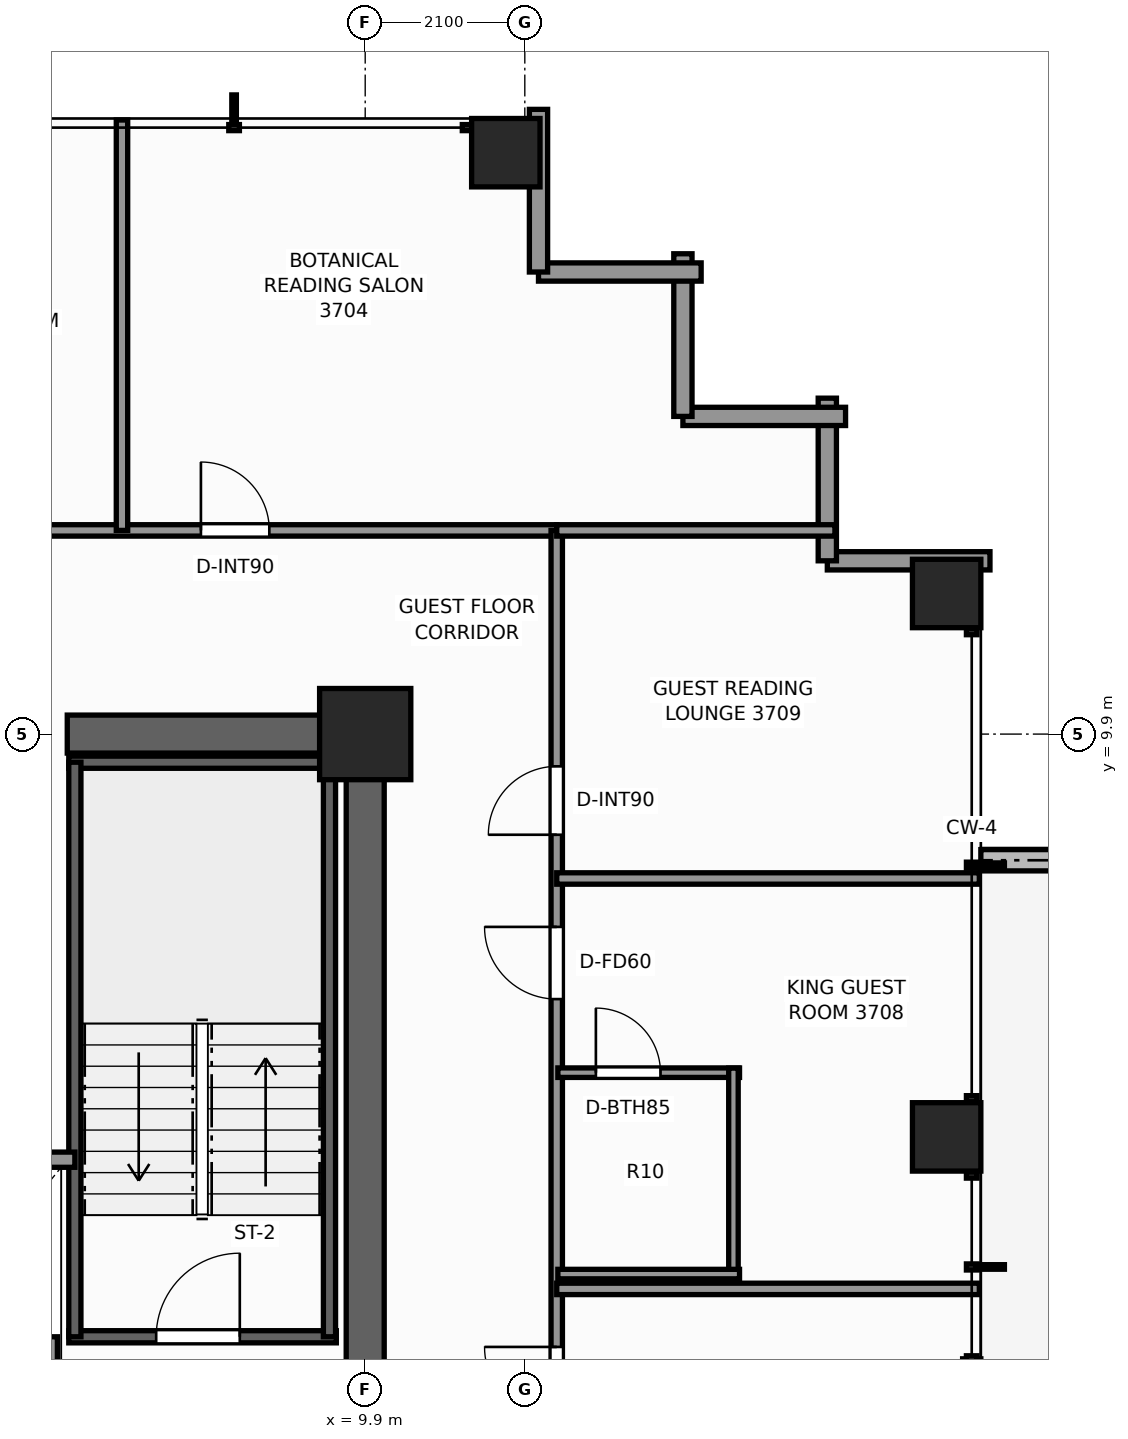
"""IFC4 building model, lengths in metres.
Left out: names, types, materials, properties, quantities, classifications, styles, units other than length and angle.
Written with IfcOpenShell. Run it as: python <this file> out.ifc"""

import sys

from ifc_helpers import new_model, si_unit, direction, frame, frame_2d, origin, origin_2d, place, context, subcontext, project, spatial, rectangle, extrude, element, fill, save


model = new_model("IFC4")
c1 = context("Model", 3, precision=1e-05, world=origin(), true_north=direction((0.0, 1.0)))
c2 = subcontext(c1, "Body", "Model", "MODEL_VIEW")
j1 = project(units=[si_unit("LENGTHUNIT", "METRE"), si_unit("PLANEANGLEUNIT", "RADIAN")], contexts=[c1])
p1 = place(None, origin())
s1 = spatial("IfcSite", under=j1, at=p1, CompositionType="ELEMENT")
p2 = place(p1, origin())
s2 = spatial("IfcBuilding", under=s1, at=p2, CompositionType="ELEMENT")
p3 = place(p2, frame((0.0, 0.0, 128.3)))
s3 = spatial("IfcBuildingStorey", under=s2, at=p3, CompositionType="ELEMENT", Elevation=128.3)
p4 = place(p3, frame((5.98, 9.9, 0.0), z_axis=(0.0, 0.0, 1.0), x_axis=(1.0, 0.0, 0.0)))
e1 = element("IfcWall", 1, at=p4, inside=s3, PredefinedType="SHEAR", context=c2, shape_type="SweptSolid", body=[
    extrude(rectangle(XDim=4.17, YDim=0.5, at=frame_2d((2.085, 0.0))), origin(), (0.0, 0.0, 1.0), 3.3),
])
p5 = place(p3, frame((9.9, -3.7, 0.0), z_axis=(0.0, 0.0, 1.0), x_axis=(0.0, 1.0, 0.0)))
e2 = element("IfcWall", 2, at=p5, inside=s3, PredefinedType="SHEAR", context=c2, shape_type="SweptSolid", body=[
    extrude(rectangle(XDim=13.35, YDim=0.5, at=frame_2d((6.675, 0.0))), origin(), (0.0, 0.0, 1.0), 3.3),
])
p6 = place(p5, frame((0.35, 0.0, 0.0)))
e3 = element("IfcOpeningElement", 3, at=p6, cuts=e2, PredefinedType="OPENING", context=c2, shape_type="SweptSolid", body=[
    extrude(rectangle(XDim=1.1, YDim=2.2, at=frame_2d((0.55, 1.1))), frame((0.0, 0.26, 0.0), z_axis=(0.0, -1.0, 0.0), x_axis=(1.0, 0.0, 0.0)), (0.0, 0.0, 1.0), 0.52),
])
p7 = place(p3, frame((9.9, 9.9, 0.0), z_axis=(0.0, 0.0, 1.0), x_axis=(1.0, 0.0, 0.0)))
e4 = element("IfcColumn", 4, at=p7, inside=s3, PredefinedType="COLUMN", context=c2, shape_type="SweptSolid", body=[
    extrude(rectangle(XDim=1.2, YDim=1.2, at=origin_2d()), origin(), (0.0, 0.0, 1.0), 3.3),
])
for number, where, z_axis, x_axis in (
    (5, (11.75, 17.55, 0.0), (0.0, 0.0, 1.0), (1.0, 0.0, 0.0)),
    (6, (17.55, 4.6, 0.0), (0.0, 0.0, 1.0), (1.0, 0.0, 0.0)),
    (7, (17.55, 11.75, 0.0), (0.0, 0.0, 1.0), (1.0, 0.0, 0.0)),
):
    element("IfcColumn", number, at=place(p3, frame(where, z_axis=z_axis, x_axis=x_axis)), inside=s3, PredefinedType="COLUMN", context=c2, shape_type="SweptSolid", body=[
        extrude(rectangle(XDim=0.9, YDim=0.9, at=origin_2d()), origin(), (0.0, 0.0, 1.0), 3.3),
    ])
p8 = place(p3, frame((19.313, 8.24, -0.02), z_axis=(0.0, 0.0, 1.0), x_axis=(-1.0, 0.0, 0.0)))
e8 = element("IfcWall", 8, at=p8, inside=s3, PredefinedType="PARAPET", context=c2, shape_type="SweptSolid", body=[
    extrude(rectangle(XDim=1.313, YDim=0.28, at=frame_2d((0.656, 0.0))), origin(), (0.0, 0.0, 1.0), 0.42),
])
for number, where, z_axis, x_axis in (
    (9, (15.98, 12.18, 0.0), (0.0, 0.0, 1.0), (1.0, 0.0, 0.0)),
    (10, (15.98, 14.32, 0.0), (0.0, 0.0, 1.0), (0.0, -1.0, 0.0)),
):
    element("IfcWall", number, at=place(p3, frame(where, z_axis=z_axis, x_axis=x_axis)), inside=s3, PredefinedType="STANDARD", context=c2, shape_type="SweptSolid", body=[
        extrude(rectangle(XDim=2.14, YDim=0.24, at=frame_2d((1.07, 0.0))), origin(), (0.0, 0.0, 1.0), 2.479),
    ])
for number, where, z_axis, x_axis in (
    (11, (14.08, 14.08, 0.0), (0.0, 0.0, 1.0), (1.0, 0.0, 0.0)),
    (12, (14.08, 16.22, 0.0), (0.0, 0.0, 1.0), (0.0, -1.0, 0.0)),
):
    element("IfcWall", number, at=place(p3, frame(where, z_axis=z_axis, x_axis=x_axis)), inside=s3, PredefinedType="STANDARD", context=c2, shape_type="SweptSolid", body=[
        extrude(rectangle(XDim=2.14, YDim=0.24, at=frame_2d((1.07, 0.0))), origin(), (0.0, 0.0, 1.0), 2.479),
    ])
for number, where, z_axis, x_axis in (
    (13, (12.18, 15.98, 0.0), (0.0, 0.0, 1.0), (1.0, 0.0, 0.0)),
    (14, (12.18, 18.12, 0.0), (0.0, 0.0, 1.0), (0.0, -1.0, 0.0)),
):
    element("IfcWall", number, at=place(p3, frame(where, z_axis=z_axis, x_axis=x_axis)), inside=s3, PredefinedType="STANDARD", context=c2, shape_type="SweptSolid", body=[
        extrude(rectangle(XDim=2.14, YDim=0.24, at=frame_2d((1.07, 0.0))), origin(), (0.0, 0.0, 1.0), 2.479),
    ])
p9 = place(p3, frame((6.0, 1.97, 0.0), z_axis=(0.0, 0.0, 1.0), x_axis=(1.0, 0.0, 0.0)))
e15 = element("IfcWall", 15, at=p9, inside=s3, PredefinedType="SHEAR", context=c2, shape_type="SweptSolid", body=[
    extrude(rectangle(XDim=3.52, YDim=0.16, at=frame_2d((1.76, 0.0))), origin(), (0.0, 0.0, 1.0), 3.3),
])
p10 = place(p9, frame((1.15, 0.0, 0.0)))
e16 = element("IfcOpeningElement", 16, at=p10, cuts=e15, PredefinedType="OPENING", context=c2, shape_type="SweptSolid", body=[
    extrude(rectangle(XDim=1.1, YDim=2.2, at=frame_2d((0.55, 1.1))), frame((0.0, 0.09, 0.0), z_axis=(0.0, -1.0, 0.0), x_axis=(1.0, 0.0, 0.0)), (0.0, 0.0, 1.0), 0.18),
])
p11 = place(p3, frame((6.0, 9.53, 0.0), z_axis=(0.0, 0.0, 1.0), x_axis=(1.0, 0.0, 0.0)))
e17 = element("IfcWall", 17, at=p11, inside=s3, PredefinedType="SHEAR", context=c2, shape_type="SweptSolid", body=[
    extrude(rectangle(XDim=3.52, YDim=0.16, at=frame_2d((1.76, 0.0))), origin(), (0.0, 0.0, 1.0), 3.3),
])
for number, where, z_axis, x_axis in (
    (18, (6.08, 1.97, 0.0), (0.0, 0.0, 1.0), (0.0, 1.0, 0.0)),
    (19, (9.43, 1.97, 0.0), (0.0, 0.0, 1.0), (0.0, 1.0, 0.0)),
):
    element("IfcWall", number, at=place(p3, frame(where, z_axis=z_axis, x_axis=x_axis)), inside=s3, PredefinedType="SHEAR", context=c2, shape_type="SweptSolid", body=[
        extrude(rectangle(XDim=7.56, YDim=0.16, at=frame_2d((3.78, 0.0))), origin(), (0.0, 0.0, 1.0), 3.3),
    ])
p12 = place(p3, frame((5.75, -3.6, 0.0), z_axis=(0.0, 0.0, 1.0), x_axis=(0.0, 1.0, 0.0)))
e20 = element("IfcWall", 20, at=p12, inside=s3, PredefinedType="SOLIDWALL", context=c2, shape_type="SweptSolid", body=[
    extrude(rectangle(XDim=5.57, YDim=0.2, at=frame_2d((2.785, 0.0))), origin(), (0.0, 0.0, 1.0), 2.735),
])
p13 = place(p12, frame((2.75, 0.0, 0.0)))
e21 = element("IfcOpeningElement", 21, at=p13, cuts=e20, PredefinedType="OPENING", context=c2, shape_type="SweptSolid", body=[
    extrude(rectangle(XDim=1.1, YDim=2.2, at=frame_2d((0.55, 1.1))), frame((0.0, 0.11, 0.0), z_axis=(0.0, -1.0, 0.0), x_axis=(1.0, 0.0, 0.0)), (0.0, 0.0, 1.0), 0.22),
])
p14 = place(p3, frame((3.35, 4.3, 0.0), z_axis=(0.0, 0.0, 1.0), x_axis=(1.0, 0.0, 0.0)))
e22 = element("IfcWall", 22, at=p14, inside=s3, PredefinedType="SOLIDWALL", context=c2, shape_type="SweptSolid", body=[
    extrude(rectangle(XDim=2.73, YDim=0.2, at=frame_2d((1.365, 0.0))), origin(), (0.0, 0.0, 1.0), 3.1),
])
p15 = place(p14, frame((0.75, 0.0, 0.0)))
e23 = element("IfcOpeningElement", 23, at=p15, cuts=e22, PredefinedType="OPENING", context=c2, shape_type="SweptSolid", body=[
    extrude(rectangle(XDim=1.2, YDim=2.25, at=frame_2d((0.6, 1.125))), frame((0.0, 0.11, 0.0), z_axis=(0.0, -1.0, 0.0), x_axis=(1.0, 0.0, 0.0)), (0.0, 0.0, 1.0), 0.22),
])
p16 = place(p3, frame((-12.26, 12.58, 0.0), z_axis=(0.0, 0.0, 1.0), x_axis=(1.0, 0.0, 0.0)))
e24 = element("IfcWall", 24, at=p16, inside=s3, PredefinedType="PARTITIONING", context=c2, shape_type="SweptSolid", body=[
    extrude(rectangle(XDim=24.68, YDim=0.15, at=frame_2d((12.34, 0.0))), origin(), (0.0, 0.0, 1.0), 2.312),
])
p17 = place(p16, frame((3.444, 0.0, 0.0)))
e25 = element("IfcOpeningElement", 25, at=p17, cuts=e24, PredefinedType="OPENING", context=c2, shape_type="SweptSolid", body=[
    extrude(rectangle(XDim=0.9, YDim=2.06, at=frame_2d((0.45, 1.03))), frame((0.0, 0.085, 0.0), z_axis=(0.0, -1.0, 0.0), x_axis=(1.0, 0.0, 0.0)), (0.0, 0.0, 1.0), 0.17),
])
p18 = place(p16, frame((5.779, 0.0, 0.0)))
e26 = element("IfcOpeningElement", 26, at=p18, cuts=e24, PredefinedType="OPENING", context=c2, shape_type="SweptSolid", body=[
    extrude(rectangle(XDim=0.9, YDim=2.06, at=frame_2d((0.45, 1.03))), frame((0.0, 0.085, 0.0), z_axis=(0.0, -1.0, 0.0), x_axis=(1.0, 0.0, 0.0)), (0.0, 0.0, 1.0), 0.17),
])
p19 = place(p16, frame((10.052, 0.0, 0.0)))
e27 = element("IfcOpeningElement", 27, at=p19, cuts=e24, PredefinedType="OPENING", context=c2, shape_type="SweptSolid", body=[
    extrude(rectangle(XDim=0.9, YDim=2.06, at=frame_2d((0.45, 1.03))), frame((0.0, 0.085, 0.0), z_axis=(0.0, -1.0, 0.0), x_axis=(1.0, 0.0, 0.0)), (0.0, 0.0, 1.0), 0.17),
])
p20 = place(p16, frame((13.179, 0.0, 0.0)))
e28 = element("IfcOpeningElement", 28, at=p20, cuts=e24, PredefinedType="OPENING", context=c2, shape_type="SweptSolid", body=[
    extrude(rectangle(XDim=0.95, YDim=2.06, at=frame_2d((0.475, 1.03))), frame((0.0, 0.085, 0.0), z_axis=(0.0, -1.0, 0.0), x_axis=(1.0, 0.0, 0.0)), (0.0, 0.0, 1.0), 0.17),
])
p21 = place(p16, frame((16.518, 0.0, 0.0)))
e29 = element("IfcOpeningElement", 29, at=p21, cuts=e24, PredefinedType="OPENING", context=c2, shape_type="SweptSolid", body=[
    extrude(rectangle(XDim=0.9, YDim=2.06, at=frame_2d((0.45, 1.03))), frame((0.0, 0.085, 0.0), z_axis=(0.0, -1.0, 0.0), x_axis=(1.0, 0.0, 0.0)), (0.0, 0.0, 1.0), 0.17),
])
p22 = place(p16, frame((19.999, 0.0, 0.0)))
e30 = element("IfcOpeningElement", 30, at=p22, cuts=e24, PredefinedType="OPENING", context=c2, shape_type="SweptSolid", body=[
    extrude(rectangle(XDim=0.9, YDim=2.06, at=frame_2d((0.45, 1.03))), frame((0.0, 0.085, 0.0), z_axis=(0.0, -1.0, 0.0), x_axis=(1.0, 0.0, 0.0)), (0.0, 0.0, 1.0), 0.17),
])
p23 = place(p3, frame((12.42, -12.26, 0.0), z_axis=(0.0, 0.0, 1.0), x_axis=(0.0, 1.0, 0.0)))
e31 = element("IfcWall", 31, at=p23, inside=s3, PredefinedType="PARTITIONING", context=c2, shape_type="SweptSolid", body=[
    extrude(rectangle(XDim=24.84, YDim=0.15, at=frame_2d((12.42, 0.0))), origin(), (0.0, 0.0, 1.0), 2.312),
])
p24 = place(p23, frame((3.831, 0.0, 0.0)))
e32 = element("IfcOpeningElement", 32, at=p24, cuts=e31, PredefinedType="OPENING", context=c2, shape_type="SweptSolid", body=[
    extrude(rectangle(XDim=0.95, YDim=2.06, at=frame_2d((0.475, 1.03))), frame((0.0, 0.085, 0.0), z_axis=(0.0, -1.0, 0.0), x_axis=(1.0, 0.0, 0.0)), (0.0, 0.0, 1.0), 0.17),
])
p25 = place(p23, frame((5.797, 0.0, 0.0)))
e33 = element("IfcOpeningElement", 33, at=p25, cuts=e31, PredefinedType="OPENING", context=c2, shape_type="SweptSolid", body=[
    extrude(rectangle(XDim=0.9, YDim=2.06, at=frame_2d((0.45, 1.03))), frame((0.0, 0.085, 0.0), z_axis=(0.0, -1.0, 0.0), x_axis=(1.0, 0.0, 0.0)), (0.0, 0.0, 1.0), 0.17),
])
p26 = place(p23, frame((13.146, 0.0, 0.0)))
e34 = element("IfcOpeningElement", 34, at=p26, cuts=e31, PredefinedType="OPENING", context=c2, shape_type="SweptSolid", body=[
    extrude(rectangle(XDim=0.95, YDim=2.06, at=frame_2d((0.475, 1.03))), frame((0.0, 0.085, 0.0), z_axis=(0.0, -1.0, 0.0), x_axis=(1.0, 0.0, 0.0)), (0.0, 0.0, 1.0), 0.17),
])
p27 = place(p23, frame((18.673, 0.0, 0.0)))
e35 = element("IfcOpeningElement", 35, at=p27, cuts=e31, PredefinedType="OPENING", context=c2, shape_type="SweptSolid", body=[
    extrude(rectangle(XDim=0.95, YDim=2.06, at=frame_2d((0.475, 1.03))), frame((0.0, 0.085, 0.0), z_axis=(0.0, -1.0, 0.0), x_axis=(1.0, 0.0, 0.0)), (0.0, 0.0, 1.0), 0.17),
])
p28 = place(p23, frame((20.836, 0.0, 0.0)))
e36 = element("IfcOpeningElement", 36, at=p28, cuts=e31, PredefinedType="OPENING", context=c2, shape_type="SweptSolid", body=[
    extrude(rectangle(XDim=0.9, YDim=2.06, at=frame_2d((0.45, 1.03))), frame((0.0, 0.085, 0.0), z_axis=(0.0, -1.0, 0.0), x_axis=(1.0, 0.0, 0.0)), (0.0, 0.0, 1.0), 0.17),
])
p29 = place(p3, frame((12.42, 12.58, 0.0), z_axis=(0.0, 0.0, 1.0), x_axis=(1.0, 0.0, 0.0)))
e37 = element("IfcWall", 37, at=p29, inside=s3, PredefinedType="PARTITIONING", context=c2, shape_type="SweptSolid", body=[
    extrude(rectangle(XDim=3.66, YDim=0.15, at=frame_2d((1.83, 0.0))), origin(), (0.0, 0.0, 1.0), 3.1),
])
p30 = place(p3, frame((6.7, 12.58, 0.0), z_axis=(0.0, 0.0, 1.0), x_axis=(0.0, 1.0, 0.0)))
e38 = element("IfcWall", 38, at=p30, inside=s3, PredefinedType="PARTITIONING", context=c2, shape_type="SweptSolid", body=[
    extrude(rectangle(XDim=5.4, YDim=0.15, at=frame_2d((2.7, 0.0))), origin(), (0.0, 0.0, 1.0), 2.469),
])
for number, where, z_axis, x_axis in (
    (39, (12.42, 2.6, 0.0), (0.0, 0.0, 1.0), (1.0, 0.0, 0.0)),
    (40, (12.42, 8.0, 0.0), (0.0, 0.0, 1.0), (1.0, 0.0, 0.0)),
):
    element("IfcWall", number, at=place(p3, frame(where, z_axis=z_axis, x_axis=x_axis)), inside=s3, PredefinedType="PARTITIONING", context=c2, shape_type="SweptSolid", body=[
        extrude(rectangle(XDim=5.56, YDim=0.15, at=frame_2d((2.78, 0.0))), origin(), (0.0, 0.0, 1.0), 2.469),
    ])
p31 = place(p3, frame((12.435, 5.445, 0.0), z_axis=(0.0, 0.0, 1.0), x_axis=(1.0, 0.0, 0.0)))
e41 = element("IfcWall", 41, at=p31, inside=s3, PredefinedType="PARTITIONING", context=c2, shape_type="SweptSolid", body=[
    extrude(rectangle(XDim=2.39, YDim=0.125, at=frame_2d((1.195, 0.0))), origin(), (0.0, 0.0, 1.0), 3.1),
])
p32 = place(p31, frame((0.5, 0.0, 0.0)))
e42 = element("IfcOpeningElement", 42, at=p32, cuts=e41, PredefinedType="OPENING", context=c2, shape_type="SweptSolid", body=[
    extrude(rectangle(XDim=0.85, YDim=2.03, at=frame_2d((0.425, 1.015))), frame((0.0, 0.073, 0.0), z_axis=(0.0, -1.0, 0.0), x_axis=(1.0, 0.0, 0.0)), (0.0, 0.0, 1.0), 0.145),
])
p33 = place(p3, frame((14.745, 2.735, 0.0), z_axis=(0.0, 0.0, 1.0), x_axis=(0.0, 1.0, 0.0)))
e43 = element("IfcWall", 43, at=p33, inside=s3, PredefinedType="PARTITIONING", context=c2, shape_type="SweptSolid", body=[
    extrude(rectangle(XDim=2.77, YDim=0.125, at=frame_2d((1.385, 0.0))), origin(), (0.0, 0.0, 1.0), 2.312),
])
p34 = place(p3, frame((12.435, 2.795, 0.0), z_axis=(0.0, 0.0, 1.0), x_axis=(1.0, 0.0, 0.0)))
e44 = element("IfcWall", 44, at=p34, inside=s3, PredefinedType="PARTITIONING", context=c2, shape_type="SweptSolid", body=[
    extrude(rectangle(XDim=2.39, YDim=0.125, at=frame_2d((1.195, 0.0))), origin(), (0.0, 0.0, 1.0), 3.1),
])
p35 = place(p10, origin())
e45 = element("IfcDoor", 45, at=p35, inside=s3, OperationType="SINGLE_SWING_RIGHT", PredefinedType="DOOR", context=c2, shape_type="SweptSolid", body=[
    extrude(rectangle(XDim=1.1, YDim=2.2, at=frame_2d((0.55, 1.1))), frame((0.0, 0.025, 0.0), z_axis=(0.0, -1.0, 0.0), x_axis=(1.0, 0.0, 0.0)), (0.0, 0.0, 1.0), 0.05),
])
fill(e16, e45)
p36 = place(p22, origin())
e46 = element("IfcDoor", 46, at=p36, inside=s3, OperationType="SINGLE_SWING_LEFT", PredefinedType="DOOR", context=c2, shape_type="SweptSolid", body=[
    extrude(rectangle(XDim=0.9, YDim=2.06, at=frame_2d((0.45, 1.03))), frame((0.0, 0.025, 0.0), z_axis=(0.0, -1.0, 0.0), x_axis=(1.0, 0.0, 0.0)), (0.0, 0.0, 1.0), 0.05),
])
fill(e30, e46)
p37 = place(p26, origin())
e47 = element("IfcDoor", 47, at=p37, inside=s3, OperationType="SINGLE_SWING_RIGHT", PredefinedType="DOOR", context=c2, shape_type="SweptSolid", body=[
    extrude(rectangle(XDim=0.95, YDim=2.06, at=frame_2d((0.475, 1.03))), frame((0.0, 0.025, 0.0), z_axis=(0.0, -1.0, 0.0), x_axis=(1.0, 0.0, 0.0)), (0.0, 0.0, 1.0), 0.05),
])
fill(e34, e47)
p38 = place(p32, origin())
e48 = element("IfcDoor", 48, at=p38, inside=s3, OperationType="SINGLE_SWING_LEFT", PredefinedType="DOOR", context=c2, shape_type="SweptSolid", body=[
    extrude(rectangle(XDim=0.85, YDim=2.03, at=frame_2d((0.425, 1.015))), frame((0.0, 0.025, 0.0), z_axis=(0.0, -1.0, 0.0), x_axis=(1.0, 0.0, 0.0)), (0.0, 0.0, 1.0), 0.05),
])
fill(e42, e48)
p39 = place(p27, origin())
e49 = element("IfcDoor", 49, at=p39, inside=s3, OperationType="SINGLE_SWING_RIGHT", PredefinedType="DOOR", context=c2, shape_type="SweptSolid", body=[
    extrude(rectangle(XDim=0.95, YDim=2.06, at=frame_2d((0.475, 1.03))), frame((0.0, 0.025, 0.0), z_axis=(0.0, -1.0, 0.0), x_axis=(1.0, 0.0, 0.0)), (0.0, 0.0, 1.0), 0.05),
])
fill(e35, e49)
p40 = place(p28, origin())
e50 = element("IfcDoor", 50, at=p40, inside=s3, OperationType="SINGLE_SWING_LEFT", PredefinedType="DOOR", context=c2, shape_type="SweptSolid", body=[
    extrude(rectangle(XDim=0.9, YDim=2.06, at=frame_2d((0.45, 1.03))), frame((0.0, 0.025, 0.0), z_axis=(0.0, -1.0, 0.0), x_axis=(1.0, 0.0, 0.0)), (0.0, 0.0, 1.0), 0.05),
])
fill(e36, e50)
save(model, sys.argv[1])
